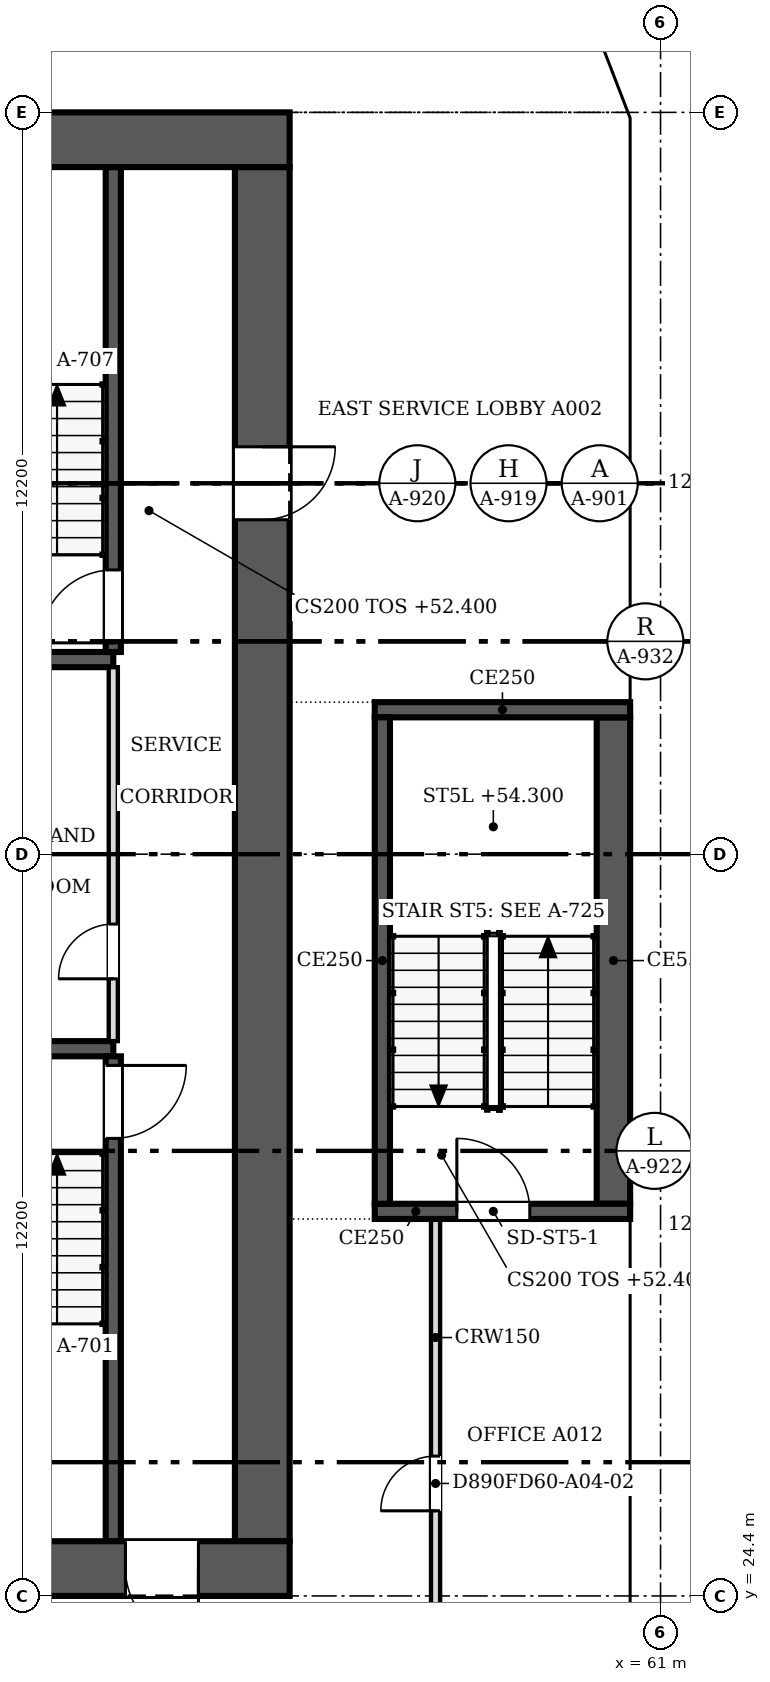
"""IFC4 building model, lengths in metres.
Left out: names, types, materials, properties, quantities, classifications, styles, units other than length and angle.
Written with IfcOpenShell. Run it as: python <this file> out.ifc"""

import sys

from ifc_helpers import new_model, si_unit, direction, frame, frame_2d, origin, place, context, subcontext, project, spatial, polyline, rectangle, outline, extrude, faceted_brep, source, transform, mapped, element, fill, save


model = new_model("IFC4")
c1 = context("Model", 3, precision=1e-05, world=origin(), true_north=direction((0.0, 1.0)))
c2 = subcontext(c1, "Body", "Model", "MODEL_VIEW")
j1 = project(units=[si_unit("LENGTHUNIT", "METRE"), si_unit("PLANEANGLEUNIT", "RADIAN")], contexts=[c1])
p1 = place(None, origin())
s1 = spatial("IfcSite", under=j1, at=p1, CompositionType="ELEMENT")
p2 = place(p1, origin())
s2 = spatial("IfcBuilding", under=s1, at=p2, CompositionType="ELEMENT")
p3 = place(p2, frame((0.0, 0.0, 52.4)))
s3 = spatial("IfcBuildingStorey", under=s2, at=p3, CompositionType="ELEMENT", Elevation=52.4)
m1 = source(origin(), c2, "Body", "Brep", [
    faceted_brep([(3.05, -0.25, 0.0), (6.1, -0.25, 3.8), (6.1, -0.25, 3.8), (3.05, -0.25, 7.6), (0.0, -0.25, 3.8), (0.0, 0.25, 3.8), (3.05, 0.25, 7.6), (6.1, 0.25, 3.8), (6.1, 0.25, 3.8), (3.05, 0.25, 0.0)], [[[0, 1, 2, 3, 4]], [[5, 6, 7, 8, 9]], [[9, 8, 1, 0]], [[7, 6, 3, 2]], [[6, 5, 4, 3]], [[5, 9, 0, 4]], [[1, 8, 7, 2]]]),
])
p4 = place(p3, frame((60.75, 21.35, -3.8), z_axis=(0.0, 0.0, 1.0), x_axis=(0.0, 1.0, 0.0)))
e1 = element("IfcWall", 1, at=p4, inside=s3, PredefinedType="SOLIDWALL", context=c2, shape_type="MappedRepresentation", body=[
    mapped(m1, transform((0.0, 0.0, 0.0), scale=1.0)),
])
m2 = source(origin(), c2, "Body", "SweptSolid", [
    extrude(outline(polyline([(3.05, 0.399), (5.78, 3.8), (3.05, 7.2), (0.321, 3.8), (3.05, 0.399)])), frame((0.0, 0.26, 0.0), z_axis=(0.0, -1.0, 0.0), x_axis=(1.0, 0.0, 0.0)), (0.0, 0.0, 1.0), 0.52),
])
p5 = place(p4, origin())
e2 = element("IfcOpeningElement", 2, at=p5, cuts=e1, PredefinedType="OPENING", context=c2, shape_type="MappedRepresentation", body=[
    mapped(m2, transform((0.0, 0.0, 0.0), scale=1.0)),
])
m3 = source(origin(), c2, "Body", "SweptSolid", [
    extrude(outline(polyline([(3.05, 0.0), (6.1, 3.8), (3.05, 7.6), (0.0, 3.8), (3.05, 0.0)])), frame((0.0, 0.25, 0.0), z_axis=(0.0, -1.0, 0.0), x_axis=(1.0, 0.0, 0.0)), (0.0, 0.0, 1.0), 0.5),
])
p6 = place(p3, frame((60.75, 27.45, -3.8), z_axis=(0.0, 0.0, 1.0), x_axis=(0.0, 1.0, 0.0)))
e3 = element("IfcWall", 3, at=p6, inside=s3, PredefinedType="SOLIDWALL", context=c2, shape_type="MappedRepresentation", body=[
    mapped(m3, transform((0.0, 0.0, 0.0), scale=1.0)),
])
p7 = place(p6, origin())
e4 = element("IfcOpeningElement", 4, at=p7, cuts=e3, PredefinedType="OPENING", context=c2, shape_type="MappedRepresentation", body=[
    mapped(m2, transform((0.0, 0.0, 0.0), scale=1.0)),
])
p8 = place(p3, frame((60.75, 33.55, -3.8), z_axis=(0.0, 0.0, 1.0), x_axis=(0.0, 1.0, 0.0)))
e5 = element("IfcWall", 5, at=p8, inside=s3, PredefinedType="SOLIDWALL", context=c2, shape_type="MappedRepresentation", body=[
    mapped(m1, transform((0.0, 0.0, 0.0), scale=1.0)),
])
p9 = place(p8, origin())
e6 = element("IfcOpeningElement", 6, at=p9, cuts=e5, PredefinedType="OPENING", context=c2, shape_type="MappedRepresentation", body=[
    mapped(m2, transform((0.0, 0.0, 0.0), scale=1.0)),
])
p10 = place(p3, frame((60.75, 39.65, -3.8), z_axis=(0.0, 0.0, 1.0), x_axis=(0.0, 1.0, 0.0)))
e7 = element("IfcWall", 7, at=p10, inside=s3, PredefinedType="SOLIDWALL", context=c2, shape_type="MappedRepresentation", body=[
    mapped(m3, transform((0.0, 0.0, 0.0), scale=1.0)),
])
p11 = place(p10, origin())
e8 = element("IfcOpeningElement", 8, at=p11, cuts=e7, PredefinedType="OPENING", context=c2, shape_type="MappedRepresentation", body=[
    mapped(m2, transform((0.0, 0.0, 0.0), scale=1.0)),
])
m4 = source(origin(), c2, "Body", "Brep", [
    faceted_brep([(3.003, -0.25, 0.0), (3.05, -0.25, 0.06), (3.05, -0.25, 7.54), (3.003, -0.25, 7.6), (0.0, -0.25, 3.8), (0.0, 0.25, 3.8), (2.957, 0.25, 7.541), (2.957, 0.25, 0.059), (3.003, 0.0, 0.0), (3.003, 0.0, 7.6)], [[[0, 1, 2, 3, 4]], [[5, 6, 7]], [[1, 0, 8]], [[9, 3, 2]], [[6, 5, 4, 3, 9]], [[5, 7, 8, 0, 4]], [[1, 8, 7, 6, 9, 2]]]),
])
p12 = place(p3, frame((60.75, 45.75, -3.8), z_axis=(0.0, 0.0, 1.0), x_axis=(0.0, 1.0, 0.0)))
e9 = element("IfcWall", 9, at=p12, inside=s3, PredefinedType="SOLIDWALL", context=c2, shape_type="MappedRepresentation", body=[
    mapped(m4, transform((0.0, 0.0, 0.0), scale=1.0)),
])
m5 = source(origin(), c2, "Body", "SweptSolid", [
    extrude(outline(polyline([(2.803, 6.944), (0.319, 3.8), (2.803, 0.656), (2.803, 6.944)])), frame((0.0, 0.26, 0.0), z_axis=(0.0, -1.0, 0.0), x_axis=(1.0, 0.0, 0.0)), (0.0, 0.0, 1.0), 0.52),
])
p13 = place(p12, origin())
e10 = element("IfcOpeningElement", 10, at=p13, cuts=e9, PredefinedType="OPENING", context=c2, shape_type="MappedRepresentation", body=[
    mapped(m5, transform((0.0, 0.0, 0.0), scale=1.0)),
])
m6 = source(origin(), c2, "Body", "Brep", [
    faceted_brep([(0.047, -0.25, 0.0), (2.997, -0.25, 3.8), (0.047, -0.25, 7.6), (0.0, -0.25, 7.541), (0.0, -0.25, 0.059), (0.093, 0.25, 7.54), (2.944, 0.25, 3.868), (2.944, 0.25, 3.732), (0.093, 0.25, 0.06), (2.997, 0.0, 3.8), (0.047, 0.0, 0.0), (0.047, 0.0, 7.6)], [[[0, 1, 2, 3, 4]], [[5, 6, 7, 8]], [[8, 7, 9, 1, 0, 10]], [[6, 5, 11, 2, 1, 9]], [[3, 2, 11]], [[10, 0, 4]], [[8, 10, 4, 3, 11, 5]], [[9, 7, 6]]]),
])
p14 = place(p3, frame((60.767, 48.71, -3.8), z_axis=(0.0, 0.0, 1.0), x_axis=(-0.359901446078, 0.932990326376, 0.0)))
e11 = element("IfcWall", 11, at=p14, inside=s3, PredefinedType="SOLIDWALL", context=c2, shape_type="MappedRepresentation", body=[
    mapped(m6, transform((0.0, 0.0, 0.0), scale=1.0)),
])
m7 = source(origin(), c2, "Body", "SweptSolid", [
    extrude(outline(polyline([(0.247, 0.665), (2.681, 3.8), (0.247, 6.935), (0.247, 0.665)])), frame((0.0, 0.26, 0.0), z_axis=(0.0, -1.0, 0.0), x_axis=(1.0, 0.0, 0.0)), (0.0, 0.0, 1.0), 0.52),
])
p15 = place(p14, origin())
e12 = element("IfcOpeningElement", 12, at=p15, cuts=e11, PredefinedType="OPENING", context=c2, shape_type="MappedRepresentation", body=[
    mapped(m7, transform((0.0, 0.0, 0.0), scale=1.0)),
])
p16 = place(p2, frame((0.0, 0.0, 56.2)))
s4 = spatial("IfcBuildingStorey", under=s2, at=p16, CompositionType="ELEMENT", Elevation=56.2)
m8 = source(origin(), c2, "Body", "Brep", [
    faceted_brep([(3.05, -0.25, 0.0), (6.1, -0.25, 3.8), (6.1, -0.25, 3.8), (3.05, -0.25, 7.6), (0.0, -0.25, 3.8), (0.0, 0.25, 3.8), (3.05, 0.25, 7.6), (6.1, 0.25, 3.8), (6.1, 0.25, 3.8), (3.05, 0.25, 0.0)], [[[0, 1, 2, 3, 4]], [[5, 6, 7, 8, 9]], [[9, 8, 1, 0]], [[7, 6, 3, 2]], [[6, 5, 4, 3]], [[5, 9, 0, 4]], [[1, 8, 7, 2]]]),
])
p17 = place(p16, frame((60.75, 18.3, -3.8), z_axis=(0.0, 0.0, 1.0), x_axis=(0.0, 1.0, 0.0)))
e13 = element("IfcWall", 13, at=p17, inside=s4, PredefinedType="SOLIDWALL", context=c2, shape_type="MappedRepresentation", body=[
    mapped(m8, transform((0.0, 0.0, 0.0), scale=1.0)),
])
m9 = source(origin(), c2, "Body", "SweptSolid", [
    extrude(outline(polyline([(3.05, 0.399), (5.78, 3.8), (3.05, 7.201), (0.321, 3.8), (3.05, 0.399)])), frame((0.0, 0.26, 0.0), z_axis=(0.0, -1.0, 0.0), x_axis=(1.0, 0.0, 0.0)), (0.0, 0.0, 1.0), 0.52),
])
p18 = place(p17, origin())
e14 = element("IfcOpeningElement", 14, at=p18, cuts=e13, PredefinedType="OPENING", context=c2, shape_type="MappedRepresentation", body=[
    mapped(m9, transform((0.0, 0.0, 0.0), scale=1.0)),
])
m10 = source(origin(), c2, "Body", "SweptSolid", [
    extrude(outline(polyline([(3.05, 0.0), (6.1, 3.8), (3.05, 7.6), (0.0, 3.8), (3.05, 0.0)])), frame((0.0, 0.25, 0.0), z_axis=(0.0, -1.0, 0.0), x_axis=(1.0, 0.0, 0.0)), (0.0, 0.0, 1.0), 0.5),
])
p19 = place(p16, frame((60.75, 24.4, -3.8), z_axis=(0.0, 0.0, 1.0), x_axis=(0.0, 1.0, 0.0)))
e15 = element("IfcWall", 15, at=p19, inside=s4, PredefinedType="SOLIDWALL", context=c2, shape_type="MappedRepresentation", body=[
    mapped(m10, transform((0.0, 0.0, 0.0), scale=1.0)),
])
p20 = place(p19, origin())
e16 = element("IfcOpeningElement", 16, at=p20, cuts=e15, PredefinedType="OPENING", context=c2, shape_type="MappedRepresentation", body=[
    mapped(m9, transform((0.0, 0.0, 0.0), scale=1.0)),
])
p21 = place(p16, frame((60.75, 30.5, -3.8), z_axis=(0.0, 0.0, 1.0), x_axis=(0.0, 1.0, 0.0)))
e17 = element("IfcWall", 17, at=p21, inside=s4, PredefinedType="SOLIDWALL", context=c2, shape_type="MappedRepresentation", body=[
    mapped(m10, transform((0.0, 0.0, 0.0), scale=1.0)),
])
p22 = place(p21, origin())
e18 = element("IfcOpeningElement", 18, at=p22, cuts=e17, PredefinedType="OPENING", context=c2, shape_type="MappedRepresentation", body=[
    mapped(m9, transform((0.0, 0.0, 0.0), scale=1.0)),
])
p23 = place(p16, frame((60.75, 36.6, -3.8), z_axis=(0.0, 0.0, 1.0), x_axis=(0.0, 1.0, 0.0)))
e19 = element("IfcWall", 19, at=p23, inside=s4, PredefinedType="SOLIDWALL", context=c2, shape_type="MappedRepresentation", body=[
    mapped(m8, transform((0.0, 0.0, 0.0), scale=1.0)),
])
p24 = place(p23, origin())
e20 = element("IfcOpeningElement", 20, at=p24, cuts=e19, PredefinedType="OPENING", context=c2, shape_type="MappedRepresentation", body=[
    mapped(m9, transform((0.0, 0.0, 0.0), scale=1.0)),
])
m11 = source(origin(), c2, "Body", "Brep", [
    faceted_brep([(3.05, -0.25, 0.0), (6.053, -0.25, 3.8), (3.05, -0.25, 7.6), (0.0, -0.25, 3.8), (0.0, 0.25, 3.8), (3.05, 0.25, 7.6), (6.007, 0.25, 3.859), (6.007, 0.25, 3.741), (3.05, 0.25, 0.0), (6.053, 0.0, 3.8)], [[[0, 1, 2, 3]], [[4, 5, 6, 7, 8]], [[8, 7, 9, 1, 0]], [[6, 5, 2, 1, 9]], [[5, 4, 3, 2]], [[4, 8, 0, 3]], [[9, 7, 6]]]),
])
p25 = place(p16, frame((60.75, 42.7, -3.8), z_axis=(0.0, 0.0, 1.0), x_axis=(0.0, 1.0, 0.0)))
e21 = element("IfcWall", 21, at=p25, inside=s4, PredefinedType="SOLIDWALL", context=c2, shape_type="MappedRepresentation", body=[
    mapped(m11, transform((0.0, 0.0, 0.0), scale=1.0)),
])
m12 = source(origin(), c2, "Body", "SweptSolid", [
    extrude(outline(polyline([(3.049, 0.401), (5.735, 3.8), (3.049, 7.199), (0.321, 3.8), (3.049, 0.401)])), frame((0.0, 0.26, 0.0), z_axis=(0.0, -1.0, 0.0), x_axis=(1.0, 0.0, 0.0)), (0.0, 0.0, 1.0), 0.52),
])
p26 = place(p25, origin())
e22 = element("IfcOpeningElement", 22, at=p26, cuts=e21, PredefinedType="OPENING", context=c2, shape_type="MappedRepresentation", body=[
    mapped(m12, transform((0.0, 0.0, 0.0), scale=1.0)),
])
m13 = source(origin(), c2, "Body", "Brep", [
    faceted_brep([(2.95, -0.25, 0.0), (3.003, -0.25, 0.068), (3.003, -0.25, 7.532), (2.95, -0.25, 7.6), (0.0, -0.25, 3.8), (0.047, 0.25, 3.86), (2.898, 0.25, 7.532), (2.898, 0.25, 0.068), (0.047, 0.25, 3.74), (2.95, 0.0, 0.0), (2.95, 0.0, 7.6), (0.0, 0.0, 3.8)], [[[0, 1, 2, 3, 4]], [[5, 6, 7, 8]], [[1, 0, 9]], [[10, 3, 2]], [[6, 5, 11, 4, 3, 10]], [[8, 7, 9, 0, 4, 11]], [[8, 11, 5]], [[1, 9, 7, 6, 10, 2]]]),
])
p27 = place(p16, frame((60.75, 48.753, -3.8), z_axis=(0.0, 0.0, 1.0), x_axis=(-0.35992665181, 0.932980602862, 0.0)))
e23 = element("IfcWall", 23, at=p27, inside=s4, PredefinedType="SOLIDWALL", context=c2, shape_type="MappedRepresentation", body=[
    mapped(m13, transform((0.0, 0.0, 0.0), scale=1.0)),
])
m14 = source(origin(), c2, "Body", "SweptSolid", [
    extrude(outline(polyline([(2.75, 6.935), (0.316, 3.8), (2.75, 0.665), (2.75, 6.935)])), frame((0.0, 0.26, 0.0), z_axis=(0.0, -1.0, 0.0), x_axis=(1.0, 0.0, 0.0)), (0.0, 0.0, 1.0), 0.52),
])
p28 = place(p27, origin())
e24 = element("IfcOpeningElement", 24, at=p28, cuts=e23, PredefinedType="OPENING", context=c2, shape_type="MappedRepresentation", body=[
    mapped(m14, transform((0.0, 0.0, 0.0), scale=1.0)),
])
p29 = place(p3, frame((54.9, 24.85, 0.0), z_axis=(0.0, 0.0, 1.0), x_axis=(-1.0, 0.0, 0.0)))
e25 = element("IfcWall", 25, at=p29, inside=s3, PredefinedType="SHEAR", context=c2, shape_type="SweptSolid", body=[
    extrude(rectangle(XDim=24.4, YDim=0.9, at=frame_2d((12.2, 0.0))), origin(), (0.0, 0.0, 1.0), 3.8),
])
m15 = source(origin(), c2, "Body", "SweptSolid", [
    extrude(rectangle(XDim=1.2, YDim=2.1, at=frame_2d((0.6, 1.05))), frame((0.0, 0.46, 0.0), z_axis=(0.0, -1.0, 0.0), x_axis=(1.0, 0.0, 0.0)), (0.0, 0.0, 1.0), 0.92),
])
p30 = place(p29, frame((1.5, 0.0, 0.0)))
e26 = element("IfcOpeningElement", 26, at=p30, cuts=e25, PredefinedType="OPENING", context=c2, shape_type="MappedRepresentation", body=[
    mapped(m15, transform((0.0, 0.0, 0.0), scale=1.0)),
])
p31 = place(p3, frame((30.5, 48.35, 0.0), z_axis=(0.0, 0.0, 1.0), x_axis=(1.0, 0.0, 0.0)))
e27 = element("IfcWall", 27, at=p31, inside=s3, PredefinedType="SHEAR", context=c2, shape_type="SweptSolid", body=[
    extrude(rectangle(XDim=24.4, YDim=0.9, at=frame_2d((12.2, 0.0))), origin(), (0.0, 0.0, 1.0), 3.8),
])
p32 = place(p3, frame((54.45, 47.9, 0.0), z_axis=(0.0, 0.0, 1.0), x_axis=(0.0, -1.0, 0.0)))
e28 = element("IfcWall", 28, at=p32, inside=s3, PredefinedType="SHEAR", context=c2, shape_type="SweptSolid", body=[
    extrude(rectangle(XDim=22.6, YDim=0.9, at=frame_2d((11.3, 0.0))), origin(), (0.0, 0.0, 1.0), 3.8),
])
p33 = place(p32, frame((4.6, 0.0, 0.0)))
e29 = element("IfcOpeningElement", 29, at=p33, cuts=e28, PredefinedType="OPENING", context=c2, shape_type="MappedRepresentation", body=[
    mapped(m15, transform((0.0, 0.0, 0.0), scale=1.0)),
])
for number, where, z_axis, x_axis in (
    (30, (48.475, 33.4, 0.0), (0.0, 0.0, 1.0), (1.0, 0.0, 0.0)),
    (31, (48.475, 39.8, 0.0), (0.0, 0.0, 1.0), (1.0, 0.0, 0.0)),
):
    element("IfcWall", number, at=place(p3, frame(where, z_axis=z_axis, x_axis=x_axis)), inside=s3, PredefinedType="SOLIDWALL", context=c2, shape_type="SweptSolid", body=[
        extrude(rectangle(XDim=3.525, YDim=0.25, at=frame_2d((1.762, 0.0))), origin(), (0.0, 0.0, 1.0), 3.8),
    ])
p34 = place(p3, frame((52.0, 25.3, 0.0), z_axis=(0.0, 0.0, 1.0), x_axis=(0.0, 1.0, 0.0)))
e32 = element("IfcWall", 32, at=p34, inside=s3, PredefinedType="SOLIDWALL", context=c2, shape_type="SweptSolid", body=[
    extrude(rectangle(XDim=7.975, YDim=0.25, at=frame_2d((3.987, 0.0))), origin(), (0.0, 0.0, 1.0), 3.8),
])
m16 = source(origin(), c2, "Body", "SweptSolid", [
    extrude(rectangle(XDim=1.2, YDim=2.1, at=frame_2d((0.6, 1.05))), frame((0.0, 0.135, 0.0), z_axis=(0.0, -1.0, 0.0), x_axis=(1.0, 0.0, 0.0)), (0.0, 0.0, 1.0), 0.27),
])
p35 = place(p34, frame((6.625, 0.0, 0.0)))
e33 = element("IfcOpeningElement", 33, at=p35, cuts=e32, PredefinedType="OPENING", context=c2, shape_type="MappedRepresentation", body=[
    mapped(m16, transform((0.0, 0.0, 0.0), scale=1.0)),
])
p36 = place(p3, frame((52.0, 39.925, 0.0), z_axis=(0.0, 0.0, 1.0), x_axis=(0.0, 1.0, 0.0)))
e34 = element("IfcWall", 34, at=p36, inside=s3, PredefinedType="SOLIDWALL", context=c2, shape_type="SweptSolid", body=[
    extrude(rectangle(XDim=7.975, YDim=0.25, at=frame_2d((3.987, 0.0))), origin(), (0.0, 0.0, 1.0), 3.8),
])
p37 = place(p36, frame((0.15, 0.0, 0.0)))
e35 = element("IfcOpeningElement", 35, at=p37, cuts=e34, PredefinedType="OPENING", context=c2, shape_type="MappedRepresentation", body=[
    mapped(m16, transform((0.0, 0.0, 0.0), scale=1.0)),
])
p38 = place(p3, frame((52.0, 33.525, 0.0), z_axis=(0.0, 0.0, 1.0), x_axis=(0.0, 1.0, 0.0)))
e36 = element("IfcWall", 36, at=p38, inside=s3, PredefinedType="PARTITIONING", context=c2, shape_type="SweptSolid", body=[
    extrude(rectangle(XDim=6.15, YDim=0.15, at=frame_2d((3.075, 0.0))), origin(), (0.0, 0.0, 1.0), 3.6),
])
m17 = source(origin(), c2, "Body", "SweptSolid", [
    extrude(rectangle(XDim=0.9, YDim=2.1, at=frame_2d((0.45, 1.05))), frame((0.0, 0.085, 0.0), z_axis=(0.0, -1.0, 0.0), x_axis=(1.0, 0.0, 0.0)), (0.0, 0.0, 1.0), 0.17),
])
p39 = place(p38, frame((1.025, 0.0, 0.0)))
e37 = element("IfcOpeningElement", 37, at=p39, cuts=e36, PredefinedType="OPENING", context=c2, shape_type="MappedRepresentation", body=[
    mapped(m17, transform((0.0, 0.0, 0.0), scale=1.0)),
])
p40 = place(p3, frame((60.5, 30.725, 0.0), z_axis=(0.0, 0.0, 1.0), x_axis=(-1.0, 0.0, 0.0)))
e38 = element("IfcWall", 38, at=p40, inside=s3, PredefinedType="SOLIDWALL", context=c2, shape_type="SweptSolid", body=[
    extrude(rectangle(XDim=4.2, YDim=0.25, at=frame_2d((2.1, 0.0))), origin(), (0.0, 0.0, 1.0), 3.8),
])
p41 = place(p40, frame((1.65, 0.0, 0.0)))
e39 = element("IfcOpeningElement", 39, at=p41, cuts=e38, PredefinedType="OPENING", context=c2, shape_type="MappedRepresentation", body=[
    mapped(m16, transform((0.0, 0.0, 0.0), scale=1.0)),
])
p42 = place(p3, frame((56.425, 30.85, 0.0), z_axis=(0.0, 0.0, 1.0), x_axis=(0.0, 1.0, 0.0)))
e40 = element("IfcWall", 40, at=p42, inside=s3, PredefinedType="SOLIDWALL", context=c2, shape_type="SweptSolid", body=[
    extrude(rectangle(XDim=8.0, YDim=0.25, at=frame_2d((4.0, 0.0))), origin(), (0.0, 0.0, 1.0), 3.8),
])
p43 = place(p3, frame((56.3, 38.975, 0.0), z_axis=(0.0, 0.0, 1.0), x_axis=(1.0, 0.0, 0.0)))
e41 = element("IfcWall", 41, at=p43, inside=s3, PredefinedType="SOLIDWALL", context=c2, shape_type="SweptSolid", body=[
    extrude(rectangle(XDim=4.2, YDim=0.25, at=frame_2d((2.1, 0.0))), origin(), (0.0, 0.0, 1.0), 3.8),
])
p44 = place(p3, frame((60.225, 38.85, 0.0), z_axis=(0.0, 0.0, 1.0), x_axis=(0.0, -1.0, 0.0)))
e42 = element("IfcWall", 42, at=p44, inside=s3, PredefinedType="SOLIDWALL", context=c2, shape_type="SweptSolid", body=[
    extrude(rectangle(XDim=8.0, YDim=0.55, at=frame_2d((4.0, 0.0))), origin(), (0.0, 0.0, 1.0), 3.8),
])
p45 = place(p3, frame((57.3, 30.6, 0.0), z_axis=(0.0, 0.0, 1.0), x_axis=(0.0, -1.0, 0.0)))
e43 = element("IfcWall", 43, at=p45, inside=s3, PredefinedType="PARTITIONING", context=c2, shape_type="SweptSolid", body=[
    extrude(rectangle(XDim=8.6, YDim=0.15, at=frame_2d((4.3, 0.0))), origin(), (0.0, 0.0, 1.0), 3.067),
])
p46 = place(p45, frame((3.9, 0.0, 0.0)))
e44 = element("IfcOpeningElement", 44, at=p46, cuts=e43, PredefinedType="OPENING", context=c2, shape_type="MappedRepresentation", body=[
    mapped(m17, transform((0.0, 0.0, 0.0), scale=1.0)),
])
m18 = source(origin(), c2, "Body", "SweptSolid", [
    extrude(rectangle(XDim=1.2, YDim=2.1, at=frame_2d((0.6, 1.05))), frame((0.0, 0.025, 0.0), z_axis=(0.0, -1.0, 0.0), x_axis=(1.0, 0.0, 0.0)), (0.0, 0.0, 1.0), 0.05),
])
p47 = place(p30, origin())
e45 = element("IfcDoor", 45, at=p47, inside=s3, OperationType="SINGLE_SWING_LEFT", PredefinedType="DOOR", context=c2, shape_type="MappedRepresentation", body=[
    mapped(m18, transform((0.0, 0.0, 0.0), scale=1.0)),
])
fill(e26, e45)
p48 = place(p33, origin())
e46 = element("IfcDoor", 46, at=p48, inside=s3, OperationType="SINGLE_SWING_LEFT", PredefinedType="DOOR", context=c2, shape_type="MappedRepresentation", body=[
    mapped(m18, transform((0.0, 0.0, 0.0), scale=1.0)),
])
fill(e29, e46)
p49 = place(p35, origin())
e47 = element("IfcDoor", 47, at=p49, inside=s3, OperationType="SINGLE_SWING_RIGHT", PredefinedType="DOOR", context=c2, shape_type="MappedRepresentation", body=[
    mapped(m18, transform((0.0, 0.0, 0.0), scale=1.0)),
])
fill(e33, e47)
p50 = place(p37, origin())
e48 = element("IfcDoor", 48, at=p50, inside=s3, OperationType="SINGLE_SWING_LEFT", PredefinedType="DOOR", context=c2, shape_type="MappedRepresentation", body=[
    mapped(m18, transform((0.0, 0.0, 0.0), scale=1.0)),
])
fill(e35, e48)
m19 = source(origin(), c2, "Body", "SweptSolid", [
    extrude(rectangle(XDim=0.9, YDim=2.1, at=frame_2d((0.45, 1.05))), frame((0.0, 0.025, 0.0), z_axis=(0.0, -1.0, 0.0), x_axis=(1.0, 0.0, 0.0)), (0.0, 0.0, 1.0), 0.05),
])
p51 = place(p39, origin())
e49 = element("IfcDoor", 49, at=p51, inside=s3, OperationType="SINGLE_SWING_LEFT", PredefinedType="DOOR", context=c2, shape_type="MappedRepresentation", body=[
    mapped(m19, transform((0.0, 0.0, 0.0), scale=1.0)),
])
fill(e37, e49)
p52 = place(p41, origin())
e50 = element("IfcDoor", 50, at=p52, inside=s3, OperationType="SINGLE_SWING_RIGHT", PredefinedType="DOOR", context=c2, shape_type="MappedRepresentation", body=[
    mapped(m18, transform((0.0, 0.0, 0.0), scale=1.0)),
])
fill(e39, e50)
p53 = place(p46, origin())
e51 = element("IfcDoor", 51, at=p53, inside=s3, OperationType="SINGLE_SWING_RIGHT", PredefinedType="DOOR", context=c2, shape_type="MappedRepresentation", body=[
    mapped(m19, transform((0.0, 0.0, 0.0), scale=1.0)),
])
fill(e44, e51)
save(model, sys.argv[1])
